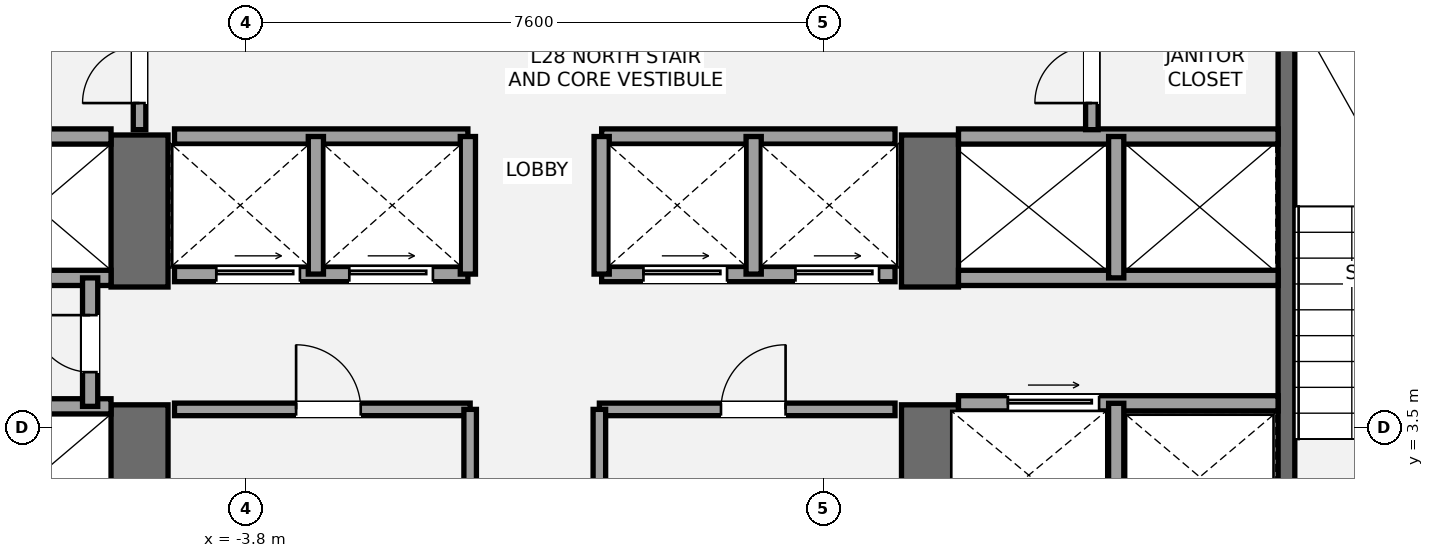
"""IFC4 building model, lengths in metres.
Left out: names, types, materials, properties, quantities, classifications, styles, units other than length and angle.
Written with IfcOpenShell. Run it as: python <this file> out.ifc"""

import sys

from ifc_helpers import new_model, si_unit, direction, frame, frame_2d, origin, place, context, subcontext, project, spatial, rectangle, extrude, element, fill, save


model = new_model("IFC4")
c1 = context("Model", 3, precision=1e-05, world=origin(), true_north=direction((0.0, 1.0)))
c2 = subcontext(c1, "Body", "Model", "MODEL_VIEW")
j1 = project(units=[si_unit("LENGTHUNIT", "METRE"), si_unit("PLANEANGLEUNIT", "RADIAN")], contexts=[c1])
p1 = place(None, origin())
s1 = spatial("IfcSite", under=j1, at=p1, CompositionType="ELEMENT")
p2 = place(p1, origin())
s2 = spatial("IfcBuilding", under=s1, at=p2, CompositionType="ELEMENT")
p3 = place(p2, frame((0.0, 0.0, 107.1)))
s3 = spatial("IfcBuildingStorey", under=s2, at=p3, CompositionType="ELEMENT", Elevation=107.1)
p4 = place(p3, frame((-5.2, 1.1, 0.0), z_axis=(0.0, 0.0, 1.0), x_axis=(0.0, 1.0, 0.0)))
e1 = element("IfcWall", 1, at=p4, inside=s3, PredefinedType="SHEAR", context=c2, shape_type="SweptSolid", body=[
    extrude(rectangle(XDim=2.7, YDim=0.75, at=frame_2d((1.35, 0.0))), origin(), (0.0, 0.0, 1.0), 3.5),
])
p5 = place(p3, frame((-5.2, 5.35, 0.0), z_axis=(0.0, 0.0, 1.0), x_axis=(0.0, 1.0, 0.0)))
e2 = element("IfcWall", 2, at=p5, inside=s3, PredefinedType="SHEAR", context=c2, shape_type="SweptSolid", body=[
    extrude(rectangle(XDim=2.0, YDim=0.75, at=frame_2d((1.0, 0.0))), origin(), (0.0, 0.0, 1.0), 3.5),
])
p6 = place(p3, frame((5.2, 1.1, 0.0), z_axis=(0.0, 0.0, 1.0), x_axis=(0.0, 1.0, 0.0)))
e3 = element("IfcWall", 3, at=p6, inside=s3, PredefinedType="SHEAR", context=c2, shape_type="SweptSolid", body=[
    extrude(rectangle(XDim=2.7, YDim=0.75, at=frame_2d((1.35, 0.0))), origin(), (0.0, 0.0, 1.0), 3.5),
])
p7 = place(p3, frame((5.2, 5.35, 0.0), z_axis=(0.0, 0.0, 1.0), x_axis=(0.0, 1.0, 0.0)))
e4 = element("IfcWall", 4, at=p7, inside=s3, PredefinedType="SHEAR", context=c2, shape_type="SweptSolid", body=[
    extrude(rectangle(XDim=2.0, YDim=0.75, at=frame_2d((1.0, 0.0))), origin(), (0.0, 0.0, 1.0), 3.5),
])
p8 = place(p3, frame((9.89, 1.85, 0.0), z_axis=(0.0, 0.0, 1.0), x_axis=(0.0, 1.0, 0.0)))
e5 = element("IfcWall", 5, at=p8, inside=s3, PredefinedType="SHEAR", context=c2, shape_type="SweptSolid", body=[
    extrude(rectangle(XDim=7.15, YDim=0.22, at=frame_2d((3.575, 0.0))), origin(), (0.0, 0.0, 1.0), 3.5),
])
for number, where, z_axis, x_axis in (
    (6, (-9.78, 3.78, 0.0), (0.0, 0.0, 1.0), (1.0, 0.0, 0.0)),
    (7, (-9.78, 5.47, 0.0), (0.0, 0.0, 1.0), (1.0, 0.0, 0.0)),
    (8, (-9.78, 7.33, 0.0), (0.0, 0.0, 1.0), (1.0, 0.0, 0.0)),
):
    element("IfcWall", number, at=place(p3, frame(where, z_axis=z_axis, x_axis=x_axis)), inside=s3, PredefinedType="SOLIDWALL", context=c2, shape_type="SweptSolid", body=[
        extrude(rectangle(XDim=4.205, YDim=0.2, at=frame_2d((2.103, 0.0))), origin(), (0.0, 0.0, 1.0), 3.31),
    ])
p9 = place(p3, frame((-5.85, 3.78, 0.0), z_axis=(0.0, 0.0, 1.0), x_axis=(0.0, 1.0, 0.0)))
e9 = element("IfcWall", 9, at=p9, inside=s3, PredefinedType="SOLIDWALL", context=c2, shape_type="SweptSolid", body=[
    extrude(rectangle(XDim=1.69, YDim=0.2, at=frame_2d((0.845, 0.0))), origin(), (0.0, 0.0, 1.0), 3.31),
])
p10 = place(p9, frame((0.45, 0.0, 0.0)))
e10 = element("IfcOpeningElement", 10, at=p10, cuts=e9, PredefinedType="OPENING", context=c2, shape_type="SweptSolid", body=[
    extrude(rectangle(XDim=0.75, YDim=2.1, at=frame_2d((0.375, 1.05))), frame((0.0, 0.11, 0.0), z_axis=(0.0, -1.0, 0.0), x_axis=(1.0, 0.0, 0.0)), (0.0, 0.0, 1.0), 0.22),
])
p11 = place(p3, frame((5.575, 3.82, 0.0), z_axis=(0.0, 0.0, 1.0), x_axis=(1.0, 0.0, 0.0)))
e11 = element("IfcWall", 11, at=p11, inside=s3, PredefinedType="SOLIDWALL", context=c2, shape_type="SweptSolid", body=[
    extrude(rectangle(XDim=4.205, YDim=0.2, at=frame_2d((2.103, 0.0))), origin(), (0.0, 0.0, 1.0), 3.31),
])
p12 = place(p11, frame((0.65, 0.0, 0.0)))
e12 = element("IfcOpeningElement", 12, at=p12, cuts=e11, PredefinedType="OPENING", context=c2, shape_type="SweptSolid", body=[
    extrude(rectangle(XDim=1.2, YDim=2.2, at=frame_2d((0.6, 1.1))), frame((0.0, 0.11, 0.0), z_axis=(0.0, -1.0, 0.0), x_axis=(1.0, 0.0, 0.0)), (0.0, 0.0, 1.0), 0.22),
])
p13 = place(p3, frame((7.65, 1.85, 0.0), z_axis=(0.0, 0.0, 1.0), x_axis=(0.0, 1.0, 0.0)))
e13 = element("IfcWall", 13, at=p13, inside=s3, PredefinedType="SOLIDWALL", context=c2, shape_type="SweptSolid", body=[
    extrude(rectangle(XDim=1.97, YDim=0.2, at=frame_2d((0.985, 0.0))), origin(), (0.0, 0.0, 1.0), 3.31),
])
for number, where, z_axis, x_axis in (
    (14, (5.575, 5.47, 0.0), (0.0, 0.0, 1.0), (1.0, 0.0, 0.0)),
    (15, (5.575, 7.33, 0.0), (0.0, 0.0, 1.0), (1.0, 0.0, 0.0)),
):
    element("IfcWall", number, at=place(p3, frame(where, z_axis=z_axis, x_axis=x_axis)), inside=s3, PredefinedType="SOLIDWALL", context=c2, shape_type="SweptSolid", body=[
        extrude(rectangle(XDim=4.205, YDim=0.2, at=frame_2d((2.103, 0.0))), origin(), (0.0, 0.0, 1.0), 3.31),
    ])
p14 = place(p3, frame((7.65, 5.47, 0.0), z_axis=(0.0, 0.0, 1.0), x_axis=(0.0, 1.0, 0.0)))
e16 = element("IfcWall", 16, at=p14, inside=s3, PredefinedType="SOLIDWALL", context=c2, shape_type="SweptSolid", body=[
    extrude(rectangle(XDim=1.86, YDim=0.2, at=frame_2d((0.93, 0.0))), origin(), (0.0, 0.0, 1.0), 3.31),
])
p15 = place(p3, frame((-4.74, 3.74, 0.0), z_axis=(0.0, 0.0, 1.0), x_axis=(1.0, 0.0, 0.0)))
e17 = element("IfcWall", 17, at=p15, inside=s3, PredefinedType="PARTITIONING", context=c2, shape_type="SweptSolid", body=[
    extrude(rectangle(XDim=3.89, YDim=0.165, at=frame_2d((1.945, 0.0))), origin(), (0.0, 0.0, 1.0), 3.31),
])
p16 = place(p15, frame((1.6, 0.0, 0.0)))
e18 = element("IfcOpeningElement", 18, at=p16, cuts=e17, PredefinedType="OPENING", context=c2, shape_type="SweptSolid", body=[
    extrude(rectangle(XDim=0.85, YDim=2.1, at=frame_2d((0.425, 1.05))), frame((0.0, 0.093, 0.0), z_axis=(0.0, -1.0, 0.0), x_axis=(1.0, 0.0, 0.0)), (0.0, 0.0, 1.0), 0.185),
])
p17 = place(p3, frame((-0.85, 1.92, 0.0), z_axis=(0.0, 0.0, 1.0), x_axis=(0.0, 1.0, 0.0)))
e19 = element("IfcWall", 19, at=p17, inside=s3, PredefinedType="PARTITIONING", context=c2, shape_type="SweptSolid", body=[
    extrude(rectangle(XDim=1.82, YDim=0.165, at=frame_2d((0.91, 0.0))), origin(), (0.0, 0.0, 1.0), 3.31),
])
p18 = place(p3, frame((0.85, 3.74, 0.0), z_axis=(0.0, 0.0, 1.0), x_axis=(1.0, 0.0, 0.0)))
e20 = element("IfcWall", 20, at=p18, inside=s3, PredefinedType="PARTITIONING", context=c2, shape_type="SweptSolid", body=[
    extrude(rectangle(XDim=3.89, YDim=0.165, at=frame_2d((1.945, 0.0))), origin(), (0.0, 0.0, 1.0), 3.31),
])
p19 = place(p18, frame((1.6, 0.0, 0.0)))
e21 = element("IfcOpeningElement", 21, at=p19, cuts=e20, PredefinedType="OPENING", context=c2, shape_type="SweptSolid", body=[
    extrude(rectangle(XDim=0.85, YDim=2.1, at=frame_2d((0.425, 1.05))), frame((0.0, 0.093, 0.0), z_axis=(0.0, -1.0, 0.0), x_axis=(1.0, 0.0, 0.0)), (0.0, 0.0, 1.0), 0.185),
])
p20 = place(p3, frame((0.85, 1.92, 0.0), z_axis=(0.0, 0.0, 1.0), x_axis=(0.0, 1.0, 0.0)))
e22 = element("IfcWall", 22, at=p20, inside=s3, PredefinedType="PARTITIONING", context=c2, shape_type="SweptSolid", body=[
    extrude(rectangle(XDim=1.82, YDim=0.165, at=frame_2d((0.91, 0.0))), origin(), (0.0, 0.0, 1.0), 3.31),
])
p21 = place(p3, frame((-4.74, 5.52, 0.0), z_axis=(0.0, 0.0, 1.0), x_axis=(1.0, 0.0, 0.0)))
e23 = element("IfcWall", 23, at=p21, inside=s3, PredefinedType="SOLIDWALL", context=c2, shape_type="SweptSolid", body=[
    extrude(rectangle(XDim=3.86, YDim=0.2, at=frame_2d((1.93, 0.0))), origin(), (0.0, 0.0, 1.0), 3.31),
])
p22 = place(p21, frame((0.55, 0.0, 0.0)))
e24 = element("IfcOpeningElement", 24, at=p22, cuts=e23, PredefinedType="OPENING", context=c2, shape_type="SweptSolid", body=[
    extrude(rectangle(XDim=1.1, YDim=2.2, at=frame_2d((0.55, 1.1))), frame((0.0, 0.11, 0.0), z_axis=(0.0, -1.0, 0.0), x_axis=(1.0, 0.0, 0.0)), (0.0, 0.0, 1.0), 0.22),
])
p23 = place(p21, frame((2.3, 0.0, 0.0)))
e25 = element("IfcOpeningElement", 25, at=p23, cuts=e23, PredefinedType="OPENING", context=c2, shape_type="SweptSolid", body=[
    extrude(rectangle(XDim=1.1, YDim=2.2, at=frame_2d((0.55, 1.1))), frame((0.0, 0.11, 0.0), z_axis=(0.0, -1.0, 0.0), x_axis=(1.0, 0.0, 0.0)), (0.0, 0.0, 1.0), 0.22),
])
p24 = place(p3, frame((0.88, 5.52, 0.0), z_axis=(0.0, 0.0, 1.0), x_axis=(1.0, 0.0, 0.0)))
e26 = element("IfcWall", 26, at=p24, inside=s3, PredefinedType="SOLIDWALL", context=c2, shape_type="SweptSolid", body=[
    extrude(rectangle(XDim=3.86, YDim=0.2, at=frame_2d((1.93, 0.0))), origin(), (0.0, 0.0, 1.0), 3.31),
])
p25 = place(p24, frame((0.55, 0.0, 0.0)))
e27 = element("IfcOpeningElement", 27, at=p25, cuts=e26, PredefinedType="OPENING", context=c2, shape_type="SweptSolid", body=[
    extrude(rectangle(XDim=1.1, YDim=2.2, at=frame_2d((0.55, 1.1))), frame((0.0, 0.11, 0.0), z_axis=(0.0, -1.0, 0.0), x_axis=(1.0, 0.0, 0.0)), (0.0, 0.0, 1.0), 0.22),
])
p26 = place(p24, frame((2.55, 0.0, 0.0)))
e28 = element("IfcOpeningElement", 28, at=p26, cuts=e26, PredefinedType="OPENING", context=c2, shape_type="SweptSolid", body=[
    extrude(rectangle(XDim=1.1, YDim=2.2, at=frame_2d((0.55, 1.1))), frame((0.0, 0.11, 0.0), z_axis=(0.0, -1.0, 0.0), x_axis=(1.0, 0.0, 0.0)), (0.0, 0.0, 1.0), 0.22),
])
for number, where, z_axis, x_axis in (
    (29, (-4.74, 7.33, 0.0), (0.0, 0.0, 1.0), (1.0, 0.0, 0.0)),
    (30, (0.88, 7.33, 0.0), (0.0, 0.0, 1.0), (1.0, 0.0, 0.0)),
):
    element("IfcWall", number, at=place(p3, frame(where, z_axis=z_axis, x_axis=x_axis)), inside=s3, PredefinedType="SOLIDWALL", context=c2, shape_type="SweptSolid", body=[
        extrude(rectangle(XDim=3.86, YDim=0.2, at=frame_2d((1.93, 0.0))), origin(), (0.0, 0.0, 1.0), 3.31),
    ])
for number, where, z_axis, x_axis in (
    (31, (-2.88, 5.52, 0.0), (0.0, 0.0, 1.0), (0.0, 1.0, 0.0)),
    (32, (2.88, 5.52, 0.0), (0.0, 0.0, 1.0), (0.0, 1.0, 0.0)),
    (33, (-0.88, 5.52, 0.0), (0.0, 0.0, 1.0), (0.0, 1.0, 0.0)),
    (34, (0.88, 5.52, 0.0), (0.0, 0.0, 1.0), (0.0, 1.0, 0.0)),
):
    element("IfcWall", number, at=place(p3, frame(where, z_axis=z_axis, x_axis=x_axis)), inside=s3, PredefinedType="SOLIDWALL", context=c2, shape_type="SweptSolid", body=[
        extrude(rectangle(XDim=1.81, YDim=0.2, at=frame_2d((0.905, 0.0))), origin(), (0.0, 0.0, 1.0), 3.31),
    ])
p27 = place(p3, frame((-5.2, 7.42, 0.0), z_axis=(0.0, 0.0, 1.0), x_axis=(0.0, 1.0, 0.0)))
e35 = element("IfcWall", 35, at=p27, inside=s3, PredefinedType="PARTITIONING", context=c2, shape_type="SweptSolid", body=[
    extrude(rectangle(XDim=1.58, YDim=0.165, at=frame_2d((0.79, 0.0))), origin(), (0.0, 0.0, 1.0), 3.31),
])
p28 = place(p27, frame((0.35, 0.0, 0.0)))
e36 = element("IfcOpeningElement", 36, at=p28, cuts=e35, PredefinedType="OPENING", context=c2, shape_type="SweptSolid", body=[
    extrude(rectangle(XDim=0.75, YDim=2.1, at=frame_2d((0.375, 1.05))), frame((0.0, 0.093, 0.0), z_axis=(0.0, -1.0, 0.0), x_axis=(1.0, 0.0, 0.0)), (0.0, 0.0, 1.0), 0.185),
])
p29 = place(p3, frame((7.33, 7.42, 0.0), z_axis=(0.0, 0.0, 1.0), x_axis=(0.0, 1.0, 0.0)))
e37 = element("IfcWall", 37, at=p29, inside=s3, PredefinedType="PARTITIONING", context=c2, shape_type="SweptSolid", body=[
    extrude(rectangle(XDim=1.58, YDim=0.165, at=frame_2d((0.79, 0.0))), origin(), (0.0, 0.0, 1.0), 3.31),
])
p30 = place(p29, frame((0.35, 0.0, 0.0)))
e38 = element("IfcOpeningElement", 38, at=p30, cuts=e37, PredefinedType="OPENING", context=c2, shape_type="SweptSolid", body=[
    extrude(rectangle(XDim=0.75, YDim=2.1, at=frame_2d((0.375, 1.05))), frame((0.0, 0.093, 0.0), z_axis=(0.0, -1.0, 0.0), x_axis=(1.0, 0.0, 0.0)), (0.0, 0.0, 1.0), 0.185),
])
p31 = place(p10, origin())
e39 = element("IfcDoor", 39, at=p31, inside=s3, OperationType="SINGLE_SWING_RIGHT", PredefinedType="DOOR", context=c2, shape_type="SweptSolid", body=[
    extrude(rectangle(XDim=0.75, YDim=2.1, at=frame_2d((0.375, 1.05))), frame((0.0, 0.025, 0.0), z_axis=(0.0, -1.0, 0.0), x_axis=(1.0, 0.0, 0.0)), (0.0, 0.0, 1.0), 0.05),
])
fill(e10, e39)
p32 = place(p12, origin())
e40 = element("IfcDoor", 40, at=p32, inside=s3, OperationType="SLIDING_TO_RIGHT", PredefinedType="DOOR", context=c2, shape_type="SweptSolid", body=[
    extrude(rectangle(XDim=1.2, YDim=2.2, at=frame_2d((0.6, 1.1))), frame((0.0, 0.025, 0.0), z_axis=(0.0, -1.0, 0.0), x_axis=(1.0, 0.0, 0.0)), (0.0, 0.0, 1.0), 0.05),
])
fill(e12, e40)
p33 = place(p16, origin())
e41 = element("IfcDoor", 41, at=p33, inside=s3, OperationType="SINGLE_SWING_LEFT", PredefinedType="DOOR", context=c2, shape_type="SweptSolid", body=[
    extrude(rectangle(XDim=0.85, YDim=2.1, at=frame_2d((0.425, 1.05))), frame((0.0, 0.025, 0.0), z_axis=(0.0, -1.0, 0.0), x_axis=(1.0, 0.0, 0.0)), (0.0, 0.0, 1.0), 0.05),
])
fill(e18, e41)
p34 = place(p19, origin())
e42 = element("IfcDoor", 42, at=p34, inside=s3, OperationType="SINGLE_SWING_RIGHT", PredefinedType="DOOR", context=c2, shape_type="SweptSolid", body=[
    extrude(rectangle(XDim=0.85, YDim=2.1, at=frame_2d((0.425, 1.05))), frame((0.0, 0.025, 0.0), z_axis=(0.0, -1.0, 0.0), x_axis=(1.0, 0.0, 0.0)), (0.0, 0.0, 1.0), 0.05),
])
fill(e21, e42)
p35 = place(p22, origin())
e43 = element("IfcDoor", 43, at=p35, inside=s3, OperationType="SLIDING_TO_LEFT", PredefinedType="DOOR", context=c2, shape_type="SweptSolid", body=[
    extrude(rectangle(XDim=1.1, YDim=2.2, at=frame_2d((0.55, 1.1))), frame((0.0, 0.025, 0.0), z_axis=(0.0, -1.0, 0.0), x_axis=(1.0, 0.0, 0.0)), (0.0, 0.0, 1.0), 0.05),
])
fill(e24, e43)
p36 = place(p23, origin())
e44 = element("IfcDoor", 44, at=p36, inside=s3, OperationType="SLIDING_TO_LEFT", PredefinedType="DOOR", context=c2, shape_type="SweptSolid", body=[
    extrude(rectangle(XDim=1.1, YDim=2.2, at=frame_2d((0.55, 1.1))), frame((0.0, 0.025, 0.0), z_axis=(0.0, -1.0, 0.0), x_axis=(1.0, 0.0, 0.0)), (0.0, 0.0, 1.0), 0.05),
])
fill(e25, e44)
p37 = place(p25, origin())
e45 = element("IfcDoor", 45, at=p37, inside=s3, OperationType="SLIDING_TO_LEFT", PredefinedType="DOOR", context=c2, shape_type="SweptSolid", body=[
    extrude(rectangle(XDim=1.1, YDim=2.2, at=frame_2d((0.55, 1.1))), frame((0.0, 0.025, 0.0), z_axis=(0.0, -1.0, 0.0), x_axis=(1.0, 0.0, 0.0)), (0.0, 0.0, 1.0), 0.05),
])
fill(e27, e45)
p38 = place(p26, origin())
e46 = element("IfcDoor", 46, at=p38, inside=s3, OperationType="SLIDING_TO_LEFT", PredefinedType="DOOR", context=c2, shape_type="SweptSolid", body=[
    extrude(rectangle(XDim=1.1, YDim=2.2, at=frame_2d((0.55, 1.1))), frame((0.0, 0.025, 0.0), z_axis=(0.0, -1.0, 0.0), x_axis=(1.0, 0.0, 0.0)), (0.0, 0.0, 1.0), 0.05),
])
fill(e28, e46)
p39 = place(p28, origin())
e47 = element("IfcDoor", 47, at=p39, inside=s3, OperationType="SINGLE_SWING_LEFT", PredefinedType="DOOR", context=c2, shape_type="SweptSolid", body=[
    extrude(rectangle(XDim=0.75, YDim=2.1, at=frame_2d((0.375, 1.05))), frame((0.0, 0.025, 0.0), z_axis=(0.0, -1.0, 0.0), x_axis=(1.0, 0.0, 0.0)), (0.0, 0.0, 1.0), 0.05),
])
fill(e36, e47)
p40 = place(p30, origin())
e48 = element("IfcDoor", 48, at=p40, inside=s3, OperationType="SINGLE_SWING_LEFT", PredefinedType="DOOR", context=c2, shape_type="SweptSolid", body=[
    extrude(rectangle(XDim=0.75, YDim=2.1, at=frame_2d((0.375, 1.05))), frame((0.0, 0.025, 0.0), z_axis=(0.0, -1.0, 0.0), x_axis=(1.0, 0.0, 0.0)), (0.0, 0.0, 1.0), 0.05),
])
fill(e38, e48)
save(model, sys.argv[1])
